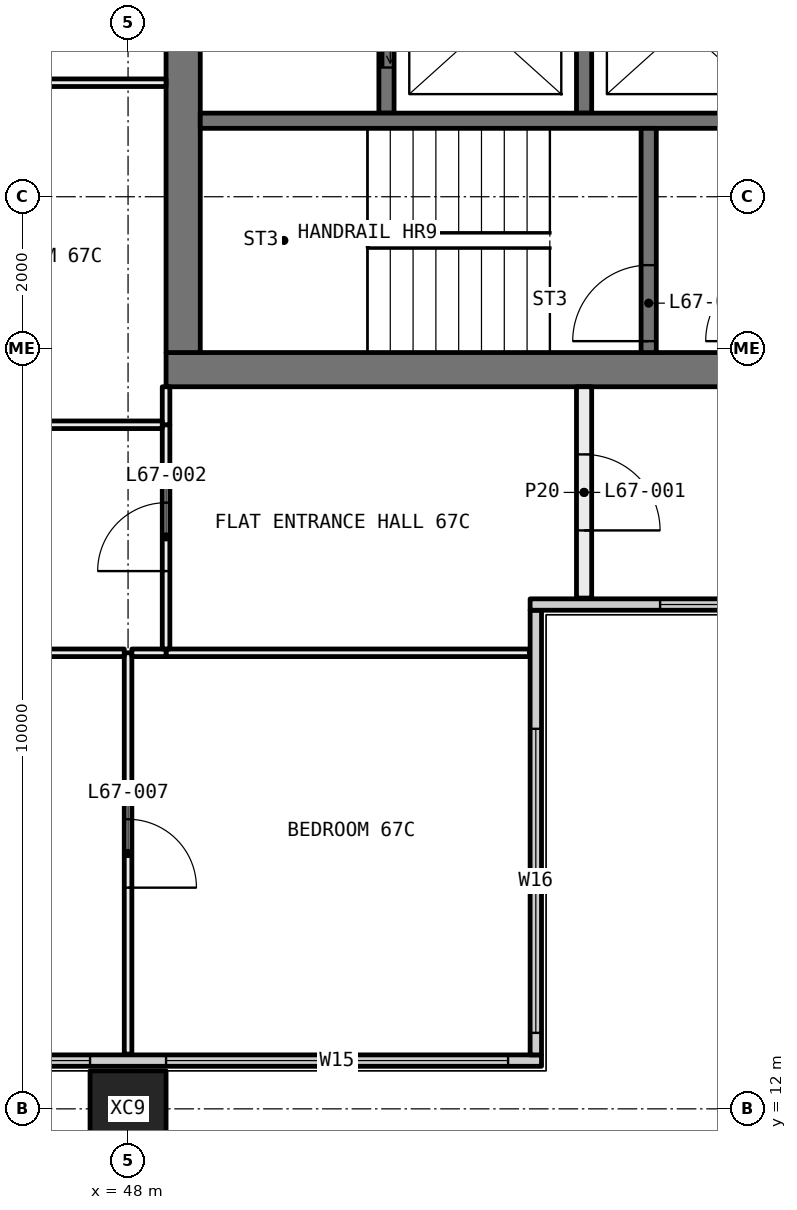
"""IFC4 building model, lengths in metres.
Left out: names, types, materials, properties, quantities, classifications, styles, units other than length and angle.
Written with IfcOpenShell. Run it as: python <this file> out.ifc"""

import sys

from ifc_helpers import new_model, si_unit, direction, frame, frame_2d, origin, origin_2d, place, context, subcontext, project, spatial, rectangle, hollow_rectangle, extrude, element, fill, save


model = new_model("IFC4")
c1 = context("Model", 3, precision=1e-05, world=origin(), true_north=direction((0.0, 1.0)))
c2 = subcontext(c1, "Body", "Model", "MODEL_VIEW")
j1 = project(units=[si_unit("LENGTHUNIT", "METRE"), si_unit("PLANEANGLEUNIT", "RADIAN")], contexts=[c1])
p1 = place(None, origin())
s1 = spatial("IfcSite", under=j1, at=p1, CompositionType="ELEMENT")
p2 = place(p1, origin())
s2 = spatial("IfcBuilding", under=s1, at=p2, CompositionType="ELEMENT")
p3 = place(p2, frame((0.0, 0.0, 249.0)))
s3 = spatial("IfcBuildingStorey", under=s2, at=p3, CompositionType="ELEMENT", Elevation=249.0)
p4 = place(p3, frame((48.0, 12.0, -0.4), z_axis=(0.0, 0.0, 1.0), x_axis=(1.0, 0.0, 0.0)))
e1 = element("IfcColumn", 1, at=p4, inside=s3, PredefinedType="COLUMN", context=c2, shape_type="SweptSolid", body=[
    extrude(hollow_rectangle(XDim=1.0, YDim=1.0, WallThickness=0.036, at=origin_2d()), origin(), (0.0, 0.0, 1.0), 3.45),
])
p5 = place(p3, frame((36.0, 12.635, 0.0), z_axis=(0.0, 0.0, 1.0), x_axis=(1.0, 0.0, 0.0)))
e2 = element("IfcWall", 2, at=p5, inside=s3, PredefinedType="ELEMENTEDWALL", context=c2, shape_type="SweptSolid", body=[
    extrude(rectangle(XDim=17.44, YDim=0.15, at=frame_2d((8.72, 0.0))), origin(), (0.0, 0.0, 1.0), 3.05),
])
p6 = place(p5, frame((0.5, 0.0, 0.45)))
e3 = element("IfcOpeningElement", 3, at=p6, cuts=e2, PredefinedType="OPENING", context=c2, shape_type="SweptSolid", body=[
    extrude(rectangle(XDim=3.0, YDim=2.55, at=frame_2d((1.5, 1.275))), frame((0.0, 0.085, 0.0), z_axis=(0.0, -1.0, 0.0), x_axis=(1.0, 0.0, 0.0)), (0.0, 0.0, 1.0), 0.17),
])
p7 = place(p5, frame((8.5, 0.0, 0.45)))
e4 = element("IfcOpeningElement", 4, at=p7, cuts=e2, PredefinedType="OPENING", context=c2, shape_type="SweptSolid", body=[
    extrude(rectangle(XDim=3.0, YDim=2.55, at=frame_2d((1.5, 1.275))), frame((0.0, 0.085, 0.0), z_axis=(0.0, -1.0, 0.0), x_axis=(1.0, 0.0, 0.0)), (0.0, 0.0, 1.0), 0.17),
])
p8 = place(p5, frame((12.5, 0.0, 0.45)))
e5 = element("IfcOpeningElement", 5, at=p8, cuts=e2, PredefinedType="OPENING", context=c2, shape_type="SweptSolid", body=[
    extrude(rectangle(XDim=4.5, YDim=2.55, at=frame_2d((2.25, 1.275))), frame((0.0, 0.085, 0.0), z_axis=(0.0, -1.0, 0.0), x_axis=(1.0, 0.0, 0.0)), (0.0, 0.0, 1.0), 0.17),
])
p9 = place(p3, frame((53.365, 12.71, 0.0), z_axis=(0.0, 0.0, 1.0), x_axis=(0.0, 1.0, 0.0)))
e6 = element("IfcWall", 6, at=p9, inside=s3, PredefinedType="ELEMENTEDWALL", context=c2, shape_type="SweptSolid", body=[
    extrude(rectangle(XDim=5.85, YDim=0.15, at=frame_2d((2.925, 0.0))), origin(), (0.0, 0.0, 1.0), 3.05),
])
p10 = place(p9, frame((0.29, 0.0, 0.45)))
e7 = element("IfcOpeningElement", 7, at=p10, cuts=e6, PredefinedType="OPENING", context=c2, shape_type="SweptSolid", body=[
    extrude(rectangle(XDim=4.0, YDim=2.55, at=frame_2d((2.0, 1.275))), frame((0.0, 0.085, 0.0), z_axis=(0.0, -1.0, 0.0), x_axis=(1.0, 0.0, 0.0)), (0.0, 0.0, 1.0), 0.17),
])
p11 = place(p3, frame((53.29, 18.635, 0.0), z_axis=(0.0, 0.0, 1.0), x_axis=(1.0, 0.0, 0.0)))
e8 = element("IfcWall", 8, at=p11, inside=s3, PredefinedType="ELEMENTEDWALL", context=c2, shape_type="SweptSolid", body=[
    extrude(rectangle(XDim=6.15, YDim=0.15, at=frame_2d((3.075, 0.0))), origin(), (0.0, 0.0, 1.0), 3.05),
])
p12 = place(p11, frame((1.71, 0.0, 0.45)))
e9 = element("IfcOpeningElement", 9, at=p12, cuts=e8, PredefinedType="OPENING", context=c2, shape_type="SweptSolid", body=[
    extrude(rectangle(XDim=4.0, YDim=2.55, at=frame_2d((2.0, 1.275))), frame((0.0, 0.085, 0.0), z_axis=(0.0, -1.0, 0.0), x_axis=(1.0, 0.0, 0.0)), (0.0, 0.0, 1.0), 0.17),
])
p13 = place(p3, frame((48.0, 12.72, 0.0), z_axis=(0.0, 0.0, 1.0), x_axis=(0.0, 1.0, 0.0)))
e10 = element("IfcWall", 10, at=p13, inside=s3, PredefinedType="PARTITIONING", context=c2, shape_type="SweptSolid", body=[
    extrude(rectangle(XDim=5.28, YDim=0.1, at=frame_2d((2.64, 0.0))), origin(), (0.0, 0.0, 1.0), 3.05),
])
p14 = place(p13, frame((2.19, 0.0, 0.0)))
e11 = element("IfcOpeningElement", 11, at=p14, cuts=e10, PredefinedType="OPENING", context=c2, shape_type="SweptSolid", body=[
    extrude(rectangle(XDim=0.9, YDim=2.1, at=frame_2d((0.45, 1.05))), frame((0.0, 0.06, 0.0), z_axis=(0.0, -1.0, 0.0), x_axis=(1.0, 0.0, 0.0)), (0.0, 0.0, 1.0), 0.12),
])
p15 = place(p3, frame((47.95, 18.0, 0.0), z_axis=(0.0, 0.0, 1.0), x_axis=(-1.0, 0.0, 0.0)))
e12 = element("IfcWall", 12, at=p15, inside=s3, PredefinedType="PARTITIONING", context=c2, shape_type="SweptSolid", body=[
    extrude(rectangle(XDim=5.875, YDim=0.1, at=frame_2d((2.938, 0.0))), origin(), (0.0, 0.0, 1.0), 3.05),
])
p16 = place(p15, frame((2.488, 0.0, 0.0)))
e13 = element("IfcOpeningElement", 13, at=p16, cuts=e12, PredefinedType="OPENING", context=c2, shape_type="SweptSolid", body=[
    extrude(rectangle(XDim=0.9, YDim=2.1, at=frame_2d((0.45, 1.05))), frame((0.0, 0.06, 0.0), z_axis=(0.0, -1.0, 0.0), x_axis=(1.0, 0.0, 0.0)), (0.0, 0.0, 1.0), 0.12),
])
p17 = place(p3, frame((53.28, 18.0, 0.0), z_axis=(0.0, 0.0, 1.0), x_axis=(-1.0, 0.0, 0.0)))
e14 = element("IfcWall", 14, at=p17, inside=s3, PredefinedType="PARTITIONING", context=c2, shape_type="SweptSolid", body=[
    extrude(rectangle(XDim=4.78, YDim=0.1, at=frame_2d((2.39, 0.0))), origin(), (0.0, 0.0, 1.0), 3.05),
])
p18 = place(p3, frame((48.5, 18.0, 0.0), z_axis=(0.0, 0.0, 1.0), x_axis=(-1.0, 0.0, 0.0)))
e15 = element("IfcWall", 15, at=p18, inside=s3, PredefinedType="PARTITIONING", context=c2, shape_type="SweptSolid", body=[
    extrude(rectangle(XDim=0.45, YDim=0.1, at=frame_2d((0.225, 0.0))), origin(), (0.0, 0.0, 1.0), 3.05),
])
p19 = place(p3, frame((48.5, 21.0, 0.0), z_axis=(0.0, 0.0, 1.0), x_axis=(0.0, -1.0, 0.0)))
e16 = element("IfcWall", 16, at=p19, inside=s3, PredefinedType="PARTITIONING", context=c2, shape_type="SweptSolid", body=[
    extrude(rectangle(XDim=2.95, YDim=0.1, at=frame_2d((1.475, 0.0))), origin(), (0.0, 0.0, 1.0), 3.05),
])
p20 = place(p19, frame((1.025, 0.0, 0.0)))
e17 = element("IfcOpeningElement", 17, at=p20, cuts=e16, PredefinedType="OPENING", context=c2, shape_type="SweptSolid", body=[
    extrude(rectangle(XDim=0.9, YDim=2.1, at=frame_2d((0.45, 1.05))), frame((0.0, 0.06, 0.0), z_axis=(0.0, -1.0, 0.0), x_axis=(1.0, 0.0, 0.0)), (0.0, 0.0, 1.0), 0.12),
])
p21 = place(p3, frame((48.5, 21.5, 0.0), z_axis=(0.0, 0.0, 1.0), x_axis=(0.0, -1.0, 0.0)))
e18 = element("IfcWall", 18, at=p21, inside=s3, PredefinedType="PARTITIONING", context=c2, shape_type="SweptSolid", body=[
    extrude(rectangle(XDim=0.5, YDim=0.1, at=frame_2d((0.25, 0.0))), origin(), (0.0, 0.0, 1.0), 3.05),
])
p22 = place(p3, frame((54.0, 18.72, 0.0), z_axis=(0.0, 0.0, 1.0), x_axis=(0.0, 1.0, 0.0)))
e19 = element("IfcWall", 19, at=p22, inside=s3, PredefinedType="PARTITIONING", context=c2, shape_type="SweptSolid", body=[
    extrude(rectangle(XDim=2.78, YDim=0.2, at=frame_2d((1.39, 0.0))), origin(), (0.0, 0.0, 1.0), 3.05),
])
p23 = place(p22, frame((0.89, 0.0, 0.0)))
e20 = element("IfcOpeningElement", 20, at=p23, cuts=e19, PredefinedType="OPENING", context=c2, shape_type="SweptSolid", body=[
    extrude(rectangle(XDim=1.0, YDim=2.1, at=frame_2d((0.5, 1.05))), frame((0.0, 0.11, 0.0), z_axis=(0.0, -1.0, 0.0), x_axis=(1.0, 0.0, 0.0)), (0.0, 0.0, 1.0), 0.22),
])
p24 = place(p3, frame((48.45, 21.0, 0.0), z_axis=(0.0, 0.0, 1.0), x_axis=(-1.0, 0.0, 0.0)))
e21 = element("IfcWall", 21, at=p24, inside=s3, PredefinedType="PARTITIONING", context=c2, shape_type="SweptSolid", body=[
    extrude(rectangle(XDim=6.4, YDim=0.1, at=frame_2d((3.2, 0.0))), origin(), (0.0, 0.0, 1.0), 3.05),
])
p25 = place(p24, frame((2.75, 0.0, 0.0)))
e22 = element("IfcOpeningElement", 22, at=p25, cuts=e21, PredefinedType="OPENING", context=c2, shape_type="SweptSolid", body=[
    extrude(rectangle(XDim=0.9, YDim=2.1, at=frame_2d((0.45, 1.05))), frame((0.0, 0.06, 0.0), z_axis=(0.0, -1.0, 0.0), x_axis=(1.0, 0.0, 0.0)), (0.0, 0.0, 1.0), 0.12),
])
p26 = place(p3, frame((48.5, 25.5, 0.0), z_axis=(0.0, 0.0, 1.0), x_axis=(-1.0, 0.0, 0.0)))
e23 = element("IfcWall", 23, at=p26, inside=s3, PredefinedType="PARTITIONING", context=c2, shape_type="SweptSolid", body=[
    extrude(rectangle(XDim=6.45, YDim=0.1, at=frame_2d((3.225, 0.0))), origin(), (0.0, 0.0, 1.0), 3.05),
])
p27 = place(p26, frame((2.775, 0.0, 0.0)))
e24 = element("IfcOpeningElement", 24, at=p27, cuts=e23, PredefinedType="OPENING", context=c2, shape_type="SweptSolid", body=[
    extrude(rectangle(XDim=0.9, YDim=2.1, at=frame_2d((0.45, 1.05))), frame((0.0, 0.06, 0.0), z_axis=(0.0, -1.0, 0.0), x_axis=(1.0, 0.0, 0.0)), (0.0, 0.0, 1.0), 0.12),
])
p28 = place(p3, frame((59.5, 21.725, 0.0), z_axis=(0.0, 0.0, 1.0), x_axis=(-1.0, 0.0, 0.0)))
e25 = element("IfcWall", 25, at=p28, inside=s3, PredefinedType="SHEAR", context=c2, shape_type="SweptSolid", body=[
    extrude(rectangle(XDim=11.0, YDim=0.45, at=frame_2d((5.5, 0.0))), origin(), (0.0, 0.0, 1.0), 3.05),
])
p29 = place(p28, frame((1.125, 0.0, 0.0)))
e26 = element("IfcOpeningElement", 26, at=p29, cuts=e25, PredefinedType="OPENING", context=c2, shape_type="SweptSolid", body=[
    extrude(rectangle(XDim=1.0, YDim=2.1, at=frame_2d((0.5, 1.05))), frame((0.0, 0.235, 0.0), z_axis=(0.0, -1.0, 0.0), x_axis=(1.0, 0.0, 0.0)), (0.0, 0.0, 1.0), 0.47),
])
p30 = place(p3, frame((48.725, 21.95, 0.0), z_axis=(0.0, 0.0, 1.0), x_axis=(0.0, 1.0, 0.0)))
e27 = element("IfcWall", 27, at=p30, inside=s3, PredefinedType="SHEAR", context=c2, shape_type="SweptSolid", body=[
    extrude(rectangle(XDim=16.1, YDim=0.45, at=frame_2d((8.05, 0.0))), origin(), (0.0, 0.0, 1.0), 3.05),
])
p31 = place(p30, frame((7.25, 0.0, 0.0)))
e28 = element("IfcOpeningElement", 28, at=p31, cuts=e27, PredefinedType="OPENING", context=c2, shape_type="SweptSolid", body=[
    extrude(rectangle(XDim=1.6, YDim=2.1, at=frame_2d((0.8, 1.05))), frame((0.0, 0.235, 0.0), z_axis=(0.0, -1.0, 0.0), x_axis=(1.0, 0.0, 0.0)), (0.0, 0.0, 1.0), 0.47),
])
p32 = place(p3, frame((51.4, 25.1, 0.0), z_axis=(0.0, 0.0, 1.0), x_axis=(0.0, 1.0, 0.0)))
e29 = element("IfcWall", 29, at=p32, inside=s3, PredefinedType="SOLIDWALL", context=c2, shape_type="SweptSolid", body=[
    extrude(rectangle(XDim=12.95, YDim=0.2, at=frame_2d((6.475, 0.0))), origin(), (0.0, 0.0, 1.0), 3.05),
])
p33 = place(p32, frame((0.6, 0.0, 0.0)))
e30 = element("IfcOpeningElement", 30, at=p33, cuts=e29, PredefinedType="OPENING", context=c2, shape_type="SweptSolid", body=[
    extrude(rectangle(XDim=1.1, YDim=2.1, at=frame_2d((0.55, 1.05))), frame((0.0, 0.11, 0.0), z_axis=(0.0, -1.0, 0.0), x_axis=(1.0, 0.0, 0.0)), (0.0, 0.0, 1.0), 0.22),
])
p34 = place(p32, frame((3.1, 0.0, 0.0)))
e31 = element("IfcOpeningElement", 31, at=p34, cuts=e29, PredefinedType="OPENING", context=c2, shape_type="SweptSolid", body=[
    extrude(rectangle(XDim=1.1, YDim=2.1, at=frame_2d((0.55, 1.05))), frame((0.0, 0.11, 0.0), z_axis=(0.0, -1.0, 0.0), x_axis=(1.0, 0.0, 0.0)), (0.0, 0.0, 1.0), 0.22),
])
p35 = place(p32, frame((5.6, 0.0, 0.0)))
e32 = element("IfcOpeningElement", 32, at=p35, cuts=e29, PredefinedType="OPENING", context=c2, shape_type="SweptSolid", body=[
    extrude(rectangle(XDim=1.1, YDim=2.1, at=frame_2d((0.55, 1.05))), frame((0.0, 0.11, 0.0), z_axis=(0.0, -1.0, 0.0), x_axis=(1.0, 0.0, 0.0)), (0.0, 0.0, 1.0), 0.22),
])
p36 = place(p32, frame((8.1, 0.0, 0.0)))
e33 = element("IfcOpeningElement", 33, at=p36, cuts=e29, PredefinedType="OPENING", context=c2, shape_type="SweptSolid", body=[
    extrude(rectangle(XDim=1.1, YDim=2.1, at=frame_2d((0.55, 1.05))), frame((0.0, 0.11, 0.0), z_axis=(0.0, -1.0, 0.0), x_axis=(1.0, 0.0, 0.0)), (0.0, 0.0, 1.0), 0.22),
])
p37 = place(p32, frame((10.975, 0.0, 0.0)))
e34 = element("IfcOpeningElement", 34, at=p37, cuts=e29, PredefinedType="OPENING", context=c2, shape_type="SweptSolid", body=[
    extrude(rectangle(XDim=1.0, YDim=2.1, at=frame_2d((0.5, 1.05))), frame((0.0, 0.11, 0.0), z_axis=(0.0, -1.0, 0.0), x_axis=(1.0, 0.0, 0.0)), (0.0, 0.0, 1.0), 0.22),
])
p38 = place(p3, frame((54.0, 25.1, 0.0), z_axis=(0.0, 0.0, 1.0), x_axis=(0.0, 1.0, 0.0)))
e35 = element("IfcWall", 35, at=p38, inside=s3, PredefinedType="SOLIDWALL", context=c2, shape_type="SweptSolid", body=[
    extrude(rectangle(XDim=9.8, YDim=0.2, at=frame_2d((4.9, 0.0))), origin(), (0.0, 0.0, 1.0), 3.05),
])
p39 = place(p3, frame((56.5, 25.0, 0.0), z_axis=(0.0, 0.0, 1.0), x_axis=(-1.0, 0.0, 0.0)))
e36 = element("IfcWall", 36, at=p39, inside=s3, PredefinedType="SOLIDWALL", context=c2, shape_type="SweptSolid", body=[
    extrude(rectangle(XDim=7.55, YDim=0.2, at=frame_2d((3.775, 0.0))), origin(), (0.0, 0.0, 1.0), 3.05),
])
p40 = place(p3, frame((54.85, 21.95, 0.0), z_axis=(0.0, 0.0, 1.0), x_axis=(0.0, 1.0, 0.0)))
e37 = element("IfcWall", 37, at=p40, inside=s3, PredefinedType="SOLIDWALL", context=c2, shape_type="SweptSolid", body=[
    extrude(rectangle(XDim=2.95, YDim=0.2, at=frame_2d((1.475, 0.0))), origin(), (0.0, 0.0, 1.0), 3.05),
])
p41 = place(p40, frame((0.15, 0.0, 0.0)))
e38 = element("IfcOpeningElement", 38, at=p41, cuts=e37, PredefinedType="OPENING", context=c2, shape_type="SweptSolid", body=[
    extrude(rectangle(XDim=1.0, YDim=2.1, at=frame_2d((0.5, 1.05))), frame((0.0, 0.11, 0.0), z_axis=(0.0, -1.0, 0.0), x_axis=(1.0, 0.0, 0.0)), (0.0, 0.0, 1.0), 0.22),
])
p42 = place(p7, origin())
e39 = element("IfcWindow", 39, at=p42, inside=s3, PartitioningType="SINGLE_PANEL", PredefinedType="WINDOW", context=c2, shape_type="SweptSolid", body=[
    extrude(rectangle(XDim=3.0, YDim=2.55, at=frame_2d((1.5, 1.275))), frame((0.0, 0.03, 0.0), z_axis=(0.0, -1.0, 0.0), x_axis=(1.0, 0.0, 0.0)), (0.0, 0.0, 1.0), 0.06),
])
fill(e4, e39)
p43 = place(p8, origin())
e40 = element("IfcWindow", 40, at=p43, inside=s3, PartitioningType="SINGLE_PANEL", PredefinedType="WINDOW", context=c2, shape_type="SweptSolid", body=[
    extrude(rectangle(XDim=4.5, YDim=2.55, at=frame_2d((2.25, 1.275))), frame((0.0, 0.03, 0.0), z_axis=(0.0, -1.0, 0.0), x_axis=(1.0, 0.0, 0.0)), (0.0, 0.0, 1.0), 0.06),
])
fill(e5, e40)
p44 = place(p10, origin())
e41 = element("IfcWindow", 41, at=p44, inside=s3, PartitioningType="SINGLE_PANEL", PredefinedType="WINDOW", context=c2, shape_type="SweptSolid", body=[
    extrude(rectangle(XDim=4.0, YDim=2.55, at=frame_2d((2.0, 1.275))), frame((0.0, 0.03, 0.0), z_axis=(0.0, -1.0, 0.0), x_axis=(1.0, 0.0, 0.0)), (0.0, 0.0, 1.0), 0.06),
])
fill(e7, e41)
p45 = place(p12, origin())
e42 = element("IfcWindow", 42, at=p45, inside=s3, PartitioningType="SINGLE_PANEL", PredefinedType="WINDOW", context=c2, shape_type="SweptSolid", body=[
    extrude(rectangle(XDim=4.0, YDim=2.55, at=frame_2d((2.0, 1.275))), frame((0.0, 0.03, 0.0), z_axis=(0.0, -1.0, 0.0), x_axis=(1.0, 0.0, 0.0)), (0.0, 0.0, 1.0), 0.06),
])
fill(e9, e42)
p46 = place(p23, frame((1.0, 0.0, 0.0), x_axis=(-1.0, 0.0, 0.0)))
e43 = element("IfcDoor", 43, at=p46, inside=s3, OperationType="SINGLE_SWING_LEFT", PredefinedType="DOOR", context=c2, shape_type="SweptSolid", body=[
    extrude(rectangle(XDim=1.0, YDim=2.1, at=frame_2d((0.5, 1.05))), frame((0.0, 0.025, 0.0), z_axis=(0.0, -1.0, 0.0), x_axis=(1.0, 0.0, 0.0)), (0.0, 0.0, 1.0), 0.05),
])
fill(e20, e43)
p47 = place(p20, frame((0.9, 0.0, 0.0), x_axis=(-1.0, 0.0, 0.0)))
e44 = element("IfcDoor", 44, at=p47, inside=s3, OperationType="SINGLE_SWING_RIGHT", PredefinedType="DOOR", context=c2, shape_type="SweptSolid", body=[
    extrude(rectangle(XDim=0.9, YDim=2.1, at=frame_2d((0.45, 1.05))), frame((0.0, 0.025, 0.0), z_axis=(0.0, -1.0, 0.0), x_axis=(1.0, 0.0, 0.0)), (0.0, 0.0, 1.0), 0.05),
])
fill(e17, e44)
p48 = place(p14, frame((0.9, 0.0, 0.0), x_axis=(-1.0, 0.0, 0.0)))
e45 = element("IfcDoor", 45, at=p48, inside=s3, OperationType="SINGLE_SWING_LEFT", PredefinedType="DOOR", context=c2, shape_type="SweptSolid", body=[
    extrude(rectangle(XDim=0.9, YDim=2.1, at=frame_2d((0.45, 1.05))), frame((0.0, 0.025, 0.0), z_axis=(0.0, -1.0, 0.0), x_axis=(1.0, 0.0, 0.0)), (0.0, 0.0, 1.0), 0.05),
])
fill(e11, e45)
p49 = place(p33, origin())
e46 = element("IfcDoor", 46, at=p49, inside=s3, OperationType="SLIDING_TO_LEFT", PredefinedType="DOOR", context=c2, shape_type="SweptSolid", body=[
    extrude(rectangle(XDim=1.1, YDim=2.1, at=frame_2d((0.55, 1.05))), frame((0.0, 0.025, 0.0), z_axis=(0.0, -1.0, 0.0), x_axis=(1.0, 0.0, 0.0)), (0.0, 0.0, 1.0), 0.05),
])
fill(e30, e46)
p50 = place(p41, origin())
e47 = element("IfcDoor", 47, at=p50, inside=s3, OperationType="SINGLE_SWING_RIGHT", PredefinedType="DOOR", context=c2, shape_type="SweptSolid", body=[
    extrude(rectangle(XDim=1.0, YDim=2.1, at=frame_2d((0.5, 1.05))), frame((0.0, 0.025, 0.0), z_axis=(0.0, -1.0, 0.0), x_axis=(1.0, 0.0, 0.0)), (0.0, 0.0, 1.0), 0.05),
])
fill(e38, e47)
save(model, sys.argv[1])
